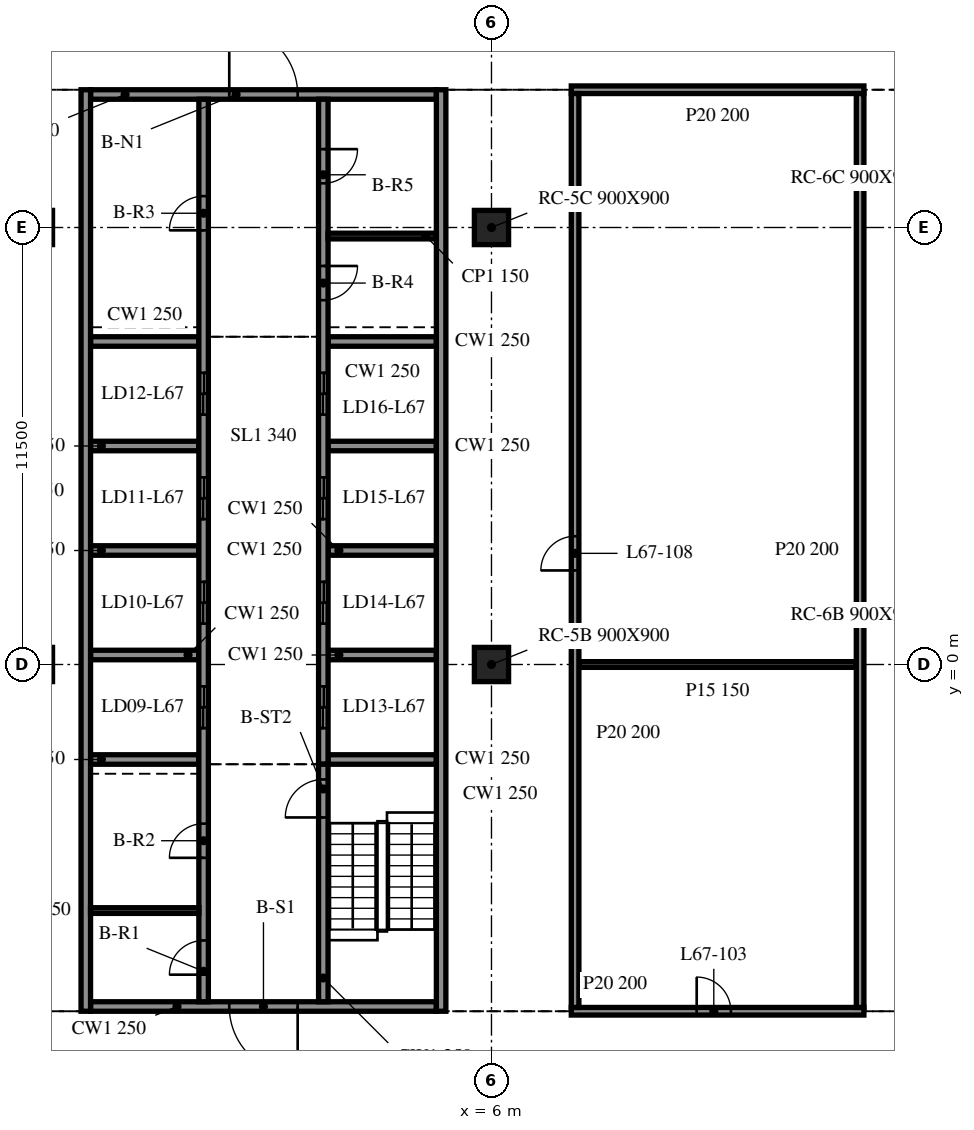
"""IFC4 building model, lengths in metres.
Left out: names, types, materials, properties, quantities, classifications, styles, units other than length and angle.
Written with IfcOpenShell. Run it as: python <this file> out.ifc"""

import sys

from ifc_helpers import new_model, si_unit, direction, frame, frame_2d, origin, origin_2d, place, context, subcontext, project, spatial, rectangle, extrude, element, fill, save


model = new_model("IFC4")
c1 = context("Model", 3, precision=1e-05, world=origin(), true_north=direction((0.0, 1.0)))
c2 = subcontext(c1, "Body", "Model", "MODEL_VIEW")
j1 = project(units=[si_unit("LENGTHUNIT", "METRE"), si_unit("PLANEANGLEUNIT", "RADIAN")], contexts=[c1])
p1 = place(None, origin())
s1 = spatial("IfcSite", under=j1, at=p1, CompositionType="ELEMENT")
p2 = place(p1, origin())
s2 = spatial("IfcBuilding", under=s1, at=p2, CompositionType="ELEMENT")
p3 = place(p2, frame((0.0, 0.0, 274.7)))
s3 = spatial("IfcBuildingStorey", under=s2, at=p3, CompositionType="ELEMENT", Elevation=274.7)
for number, where, z_axis, x_axis in (
    (1, (6.0, 0.0, -0.34), (0.0, 0.0, 1.0), (1.0, 0.0, 0.0)),
    (2, (6.0, 11.5, -0.34), (0.0, 0.0, 1.0), (1.0, 0.0, 0.0)),
):
    element("IfcColumn", number, at=place(p3, frame(where, z_axis=z_axis, x_axis=x_axis)), inside=s3, PredefinedType="COLUMN", context=c2, shape_type="SweptSolid", body=[
        extrude(rectangle(XDim=0.9, YDim=0.9, at=origin_2d()), origin(), (0.0, 0.0, 1.0), 3.8),
    ])
for number, where, z_axis, x_axis in (
    (3, (-4.675, 15.125, 0.0), (0.0, 0.0, 1.0), (0.0, -1.0, 0.0)),
    (4, (4.675, -9.125, 0.0), (0.0, 0.0, 1.0), (0.0, 1.0, 0.0)),
):
    element("IfcWall", number, at=place(p3, frame(where, z_axis=z_axis, x_axis=x_axis)), inside=s3, PredefinedType="SOLIDWALL", context=c2, shape_type="SweptSolid", body=[
        extrude(rectangle(XDim=24.25, YDim=0.25, at=frame_2d((12.125, 0.0))), origin(), (0.0, 0.0, 1.0), 3.46),
    ])
p4 = place(p3, frame((4.55, -9.0, 0.0), z_axis=(0.0, 0.0, 1.0), x_axis=(-1.0, 0.0, 0.0)))
e5 = element("IfcWall", 5, at=p4, inside=s3, PredefinedType="SOLIDWALL", context=c2, shape_type="SweptSolid", body=[
    extrude(rectangle(XDim=9.1, YDim=0.25, at=frame_2d((4.55, 0.0))), origin(), (0.0, 0.0, 1.0), 3.46),
])
p5 = place(p4, frame((3.65, 0.0, 0.0)))
e6 = element("IfcOpeningElement", 6, at=p5, cuts=e5, PredefinedType="OPENING", context=c2, shape_type="SweptSolid", body=[
    extrude(rectangle(XDim=1.8, YDim=2.1, at=frame_2d((0.9, 1.05))), frame((0.0, 0.135, 0.0), z_axis=(0.0, -1.0, 0.0), x_axis=(1.0, 0.0, 0.0)), (0.0, 0.0, 1.0), 0.27),
])
p6 = place(p3, frame((-4.55, 15.0, 0.0), z_axis=(0.0, 0.0, 1.0), x_axis=(1.0, 0.0, 0.0)))
e7 = element("IfcWall", 7, at=p6, inside=s3, PredefinedType="SOLIDWALL", context=c2, shape_type="SweptSolid", body=[
    extrude(rectangle(XDim=9.1, YDim=0.25, at=frame_2d((4.55, 0.0))), origin(), (0.0, 0.0, 1.0), 3.46),
])
p7 = place(p6, frame((3.65, 0.0, 0.0)))
e8 = element("IfcOpeningElement", 8, at=p7, cuts=e7, PredefinedType="OPENING", context=c2, shape_type="SweptSolid", body=[
    extrude(rectangle(XDim=1.8, YDim=2.1, at=frame_2d((0.9, 1.05))), frame((0.0, 0.135, 0.0), z_axis=(0.0, -1.0, 0.0), x_axis=(1.0, 0.0, 0.0)), (0.0, 0.0, 1.0), 0.27),
])
p8 = place(p3, frame((-1.575, -8.875, 0.0), z_axis=(0.0, 0.0, 1.0), x_axis=(0.0, 1.0, 0.0)))
e9 = element("IfcWall", 9, at=p8, inside=s3, PredefinedType="SOLIDWALL", context=c2, shape_type="SweptSolid", body=[
    extrude(rectangle(XDim=23.75, YDim=0.25, at=frame_2d((11.875, 0.0))), origin(), (0.0, 0.0, 1.0), 3.46),
])
p9 = place(p8, frame((7.2, 0.0, 0.0)))
e10 = element("IfcOpeningElement", 10, at=p9, cuts=e9, PredefinedType="OPENING", context=c2, shape_type="SweptSolid", body=[
    extrude(rectangle(XDim=1.1, YDim=2.1, at=frame_2d((0.55, 1.05))), frame((0.0, 0.135, 0.0), z_axis=(0.0, -1.0, 0.0), x_axis=(1.0, 0.0, 0.0)), (0.0, 0.0, 1.0), 0.27),
])
p10 = place(p8, frame((9.95, 0.0, 0.0)))
e11 = element("IfcOpeningElement", 11, at=p10, cuts=e9, PredefinedType="OPENING", context=c2, shape_type="SweptSolid", body=[
    extrude(rectangle(XDim=1.1, YDim=2.1, at=frame_2d((0.55, 1.05))), frame((0.0, 0.135, 0.0), z_axis=(0.0, -1.0, 0.0), x_axis=(1.0, 0.0, 0.0)), (0.0, 0.0, 1.0), 0.27),
])
p11 = place(p8, frame((12.7, 0.0, 0.0)))
e12 = element("IfcOpeningElement", 12, at=p11, cuts=e9, PredefinedType="OPENING", context=c2, shape_type="SweptSolid", body=[
    extrude(rectangle(XDim=1.1, YDim=2.1, at=frame_2d((0.55, 1.05))), frame((0.0, 0.135, 0.0), z_axis=(0.0, -1.0, 0.0), x_axis=(1.0, 0.0, 0.0)), (0.0, 0.0, 1.0), 0.27),
])
p12 = place(p8, frame((15.45, 0.0, 0.0)))
e13 = element("IfcOpeningElement", 13, at=p12, cuts=e9, PredefinedType="OPENING", context=c2, shape_type="SweptSolid", body=[
    extrude(rectangle(XDim=1.1, YDim=2.1, at=frame_2d((0.55, 1.05))), frame((0.0, 0.135, 0.0), z_axis=(0.0, -1.0, 0.0), x_axis=(1.0, 0.0, 0.0)), (0.0, 0.0, 1.0), 0.27),
])
p13 = place(p8, frame((0.712, 0.0, 0.0)))
e14 = element("IfcOpeningElement", 14, at=p13, cuts=e9, PredefinedType="OPENING", context=c2, shape_type="SweptSolid", body=[
    extrude(rectangle(XDim=0.9, YDim=2.1, at=frame_2d((0.45, 1.05))), frame((0.0, 0.135, 0.0), z_axis=(0.0, -1.0, 0.0), x_axis=(1.0, 0.0, 0.0)), (0.0, 0.0, 1.0), 0.27),
])
p14 = place(p8, frame((3.788, 0.0, 0.0)))
e15 = element("IfcOpeningElement", 15, at=p14, cuts=e9, PredefinedType="OPENING", context=c2, shape_type="SweptSolid", body=[
    extrude(rectangle(XDim=0.9, YDim=2.1, at=frame_2d((0.45, 1.05))), frame((0.0, 0.135, 0.0), z_axis=(0.0, -1.0, 0.0), x_axis=(1.0, 0.0, 0.0)), (0.0, 0.0, 1.0), 0.27),
])
p15 = place(p8, frame((20.3, 0.0, 0.0)))
e16 = element("IfcOpeningElement", 16, at=p15, cuts=e9, PredefinedType="OPENING", context=c2, shape_type="SweptSolid", body=[
    extrude(rectangle(XDim=0.9, YDim=2.1, at=frame_2d((0.45, 1.05))), frame((0.0, 0.135, 0.0), z_axis=(0.0, -1.0, 0.0), x_axis=(1.0, 0.0, 0.0)), (0.0, 0.0, 1.0), 0.27),
])
p16 = place(p3, frame((1.575, -8.875, 0.0), z_axis=(0.0, 0.0, 1.0), x_axis=(0.0, 1.0, 0.0)))
e17 = element("IfcWall", 17, at=p16, inside=s3, PredefinedType="SOLIDWALL", context=c2, shape_type="SweptSolid", body=[
    extrude(rectangle(XDim=6.25, YDim=0.25, at=frame_2d((3.125, 0.0))), origin(), (0.0, 0.0, 1.0), 3.46),
])
p17 = place(p16, frame((4.85, 0.0, 0.0)))
e18 = element("IfcOpeningElement", 18, at=p17, cuts=e17, PredefinedType="OPENING", context=c2, shape_type="SweptSolid", body=[
    extrude(rectangle(XDim=1.0, YDim=2.1, at=frame_2d((0.5, 1.05))), frame((0.0, 0.135, 0.0), z_axis=(0.0, -1.0, 0.0), x_axis=(1.0, 0.0, 0.0)), (0.0, 0.0, 1.0), 0.27),
])
p18 = place(p3, frame((1.575, 14.875, 0.0), z_axis=(0.0, 0.0, 1.0), x_axis=(0.0, -1.0, 0.0)))
e19 = element("IfcWall", 19, at=p18, inside=s3, PredefinedType="SOLIDWALL", context=c2, shape_type="SweptSolid", body=[
    extrude(rectangle(XDim=17.5, YDim=0.25, at=frame_2d((8.75, 0.0))), origin(), (0.0, 0.0, 1.0), 3.46),
])
p19 = place(p18, frame((15.45, 0.0, 0.0)))
e20 = element("IfcOpeningElement", 20, at=p19, cuts=e19, PredefinedType="OPENING", context=c2, shape_type="SweptSolid", body=[
    extrude(rectangle(XDim=1.1, YDim=2.1, at=frame_2d((0.55, 1.05))), frame((0.0, 0.135, 0.0), z_axis=(0.0, -1.0, 0.0), x_axis=(1.0, 0.0, 0.0)), (0.0, 0.0, 1.0), 0.27),
])
p20 = place(p18, frame((12.7, 0.0, 0.0)))
e21 = element("IfcOpeningElement", 21, at=p20, cuts=e19, PredefinedType="OPENING", context=c2, shape_type="SweptSolid", body=[
    extrude(rectangle(XDim=1.1, YDim=2.1, at=frame_2d((0.55, 1.05))), frame((0.0, 0.135, 0.0), z_axis=(0.0, -1.0, 0.0), x_axis=(1.0, 0.0, 0.0)), (0.0, 0.0, 1.0), 0.27),
])
p21 = place(p18, frame((9.95, 0.0, 0.0)))
e22 = element("IfcOpeningElement", 22, at=p21, cuts=e19, PredefinedType="OPENING", context=c2, shape_type="SweptSolid", body=[
    extrude(rectangle(XDim=1.1, YDim=2.1, at=frame_2d((0.55, 1.05))), frame((0.0, 0.135, 0.0), z_axis=(0.0, -1.0, 0.0), x_axis=(1.0, 0.0, 0.0)), (0.0, 0.0, 1.0), 0.27),
])
p22 = place(p18, frame((7.2, 0.0, 0.0)))
e23 = element("IfcOpeningElement", 23, at=p22, cuts=e19, PredefinedType="OPENING", context=c2, shape_type="SweptSolid", body=[
    extrude(rectangle(XDim=1.1, YDim=2.1, at=frame_2d((0.55, 1.05))), frame((0.0, 0.135, 0.0), z_axis=(0.0, -1.0, 0.0), x_axis=(1.0, 0.0, 0.0)), (0.0, 0.0, 1.0), 0.27),
])
p23 = place(p18, frame((4.387, 0.0, 0.0)))
e24 = element("IfcOpeningElement", 24, at=p23, cuts=e19, PredefinedType="OPENING", context=c2, shape_type="SweptSolid", body=[
    extrude(rectangle(XDim=0.9, YDim=2.1, at=frame_2d((0.45, 1.05))), frame((0.0, 0.135, 0.0), z_axis=(0.0, -1.0, 0.0), x_axis=(1.0, 0.0, 0.0)), (0.0, 0.0, 1.0), 0.27),
])
p24 = place(p18, frame((1.312, 0.0, 0.0)))
e25 = element("IfcOpeningElement", 25, at=p24, cuts=e19, PredefinedType="OPENING", context=c2, shape_type="SweptSolid", body=[
    extrude(rectangle(XDim=0.9, YDim=2.1, at=frame_2d((0.45, 1.05))), frame((0.0, 0.135, 0.0), z_axis=(0.0, -1.0, 0.0), x_axis=(1.0, 0.0, 0.0)), (0.0, 0.0, 1.0), 0.27),
])
for number, where, z_axis, x_axis in (
    (26, (-4.55, -2.5, 0.0), (0.0, 0.0, 1.0), (1.0, 0.0, 0.0)),
    (27, (-4.55, 0.25, 0.0), (0.0, 0.0, 1.0), (1.0, 0.0, 0.0)),
    (28, (-4.55, 3.0, 0.0), (0.0, 0.0, 1.0), (1.0, 0.0, 0.0)),
    (29, (-4.55, 5.75, 0.0), (0.0, 0.0, 1.0), (1.0, 0.0, 0.0)),
    (30, (-4.55, 8.5, 0.0), (0.0, 0.0, 1.0), (1.0, 0.0, 0.0)),
    (31, (1.7, -2.5, 0.0), (0.0, 0.0, 1.0), (1.0, 0.0, 0.0)),
    (32, (1.7, 0.25, 0.0), (0.0, 0.0, 1.0), (1.0, 0.0, 0.0)),
    (33, (1.7, 3.0, 0.0), (0.0, 0.0, 1.0), (1.0, 0.0, 0.0)),
    (34, (1.7, 5.75, 0.0), (0.0, 0.0, 1.0), (1.0, 0.0, 0.0)),
    (35, (1.7, 8.5, 0.0), (0.0, 0.0, 1.0), (1.0, 0.0, 0.0)),
):
    element("IfcWall", number, at=place(p3, frame(where, z_axis=z_axis, x_axis=x_axis)), inside=s3, PredefinedType="SOLIDWALL", context=c2, shape_type="SweptSolid", body=[
        extrude(rectangle(XDim=2.85, YDim=0.25, at=frame_2d((1.425, 0.0))), origin(), (0.0, 0.0, 1.0), 3.46),
    ])
for number, where, z_axis, x_axis in (
    (36, (-4.55, -6.475, 0.0), (0.0, 0.0, 1.0), (1.0, 0.0, 0.0)),
    (37, (1.7, 11.275, 0.0), (0.0, 0.0, 1.0), (1.0, 0.0, 0.0)),
):
    element("IfcWall", number, at=place(p3, frame(where, z_axis=z_axis, x_axis=x_axis)), inside=s3, PredefinedType="PARTITIONING", context=c2, shape_type="SweptSolid", body=[
        extrude(rectangle(XDim=2.85, YDim=0.15, at=frame_2d((1.425, 0.0))), origin(), (0.0, 0.0, 1.0), 3.46),
    ])
p25 = place(p3, frame((8.1, -9.125, 0.0), z_axis=(0.0, 0.0, 1.0), x_axis=(1.0, 0.0, 0.0)))
e38 = element("IfcWall", 38, at=p25, inside=s3, PredefinedType="PARTITIONING", context=c2, shape_type="SweptSolid", body=[
    extrude(rectangle(XDim=7.7, YDim=0.2, at=frame_2d((3.85, 0.0))), origin(), (0.0, 0.0, 1.0), 3.46),
])
p26 = place(p25, frame((3.3, 0.0, 0.0)))
e39 = element("IfcOpeningElement", 39, at=p26, cuts=e38, PredefinedType="OPENING", context=c2, shape_type="SweptSolid", body=[
    extrude(rectangle(XDim=0.9, YDim=2.1, at=frame_2d((0.45, 1.05))), frame((0.0, 0.11, 0.0), z_axis=(0.0, -1.0, 0.0), x_axis=(1.0, 0.0, 0.0)), (0.0, 0.0, 1.0), 0.22),
])
p27 = place(p3, frame((8.3, 0.0, 0.0), z_axis=(0.0, 0.0, 1.0), x_axis=(1.0, 0.0, 0.0)))
e40 = element("IfcWall", 40, at=p27, inside=s3, PredefinedType="PARTITIONING", context=c2, shape_type="SweptSolid", body=[
    extrude(rectangle(XDim=7.3, YDim=0.15, at=frame_2d((3.65, 0.0))), origin(), (0.0, 0.0, 1.0), 3.46),
])
p28 = place(p3, frame((8.1, 15.125, 0.0), z_axis=(0.0, 0.0, 1.0), x_axis=(1.0, 0.0, 0.0)))
e41 = element("IfcWall", 41, at=p28, inside=s3, PredefinedType="PARTITIONING", context=c2, shape_type="SweptSolid", body=[
    extrude(rectangle(XDim=7.7, YDim=0.2, at=frame_2d((3.85, 0.0))), origin(), (0.0, 0.0, 1.0), 3.46),
])
p29 = place(p3, frame((8.2, -9.025, 0.0), z_axis=(0.0, 0.0, 1.0), x_axis=(0.0, 1.0, 0.0)))
e42 = element("IfcWall", 42, at=p29, inside=s3, PredefinedType="PARTITIONING", context=c2, shape_type="SweptSolid", body=[
    extrude(rectangle(XDim=24.05, YDim=0.2, at=frame_2d((12.025, 0.0))), origin(), (0.0, 0.0, 1.0), 3.46),
])
p30 = place(p29, frame((11.5, 0.0, 0.0)))
e43 = element("IfcOpeningElement", 43, at=p30, cuts=e42, PredefinedType="OPENING", context=c2, shape_type="SweptSolid", body=[
    extrude(rectangle(XDim=0.9, YDim=2.1, at=frame_2d((0.45, 1.05))), frame((0.0, 0.11, 0.0), z_axis=(0.0, -1.0, 0.0), x_axis=(1.0, 0.0, 0.0)), (0.0, 0.0, 1.0), 0.22),
])
p31 = place(p3, frame((15.7, -9.025, 0.0), z_axis=(0.0, 0.0, 1.0), x_axis=(0.0, 1.0, 0.0)))
e44 = element("IfcWall", 44, at=p31, inside=s3, PredefinedType="PARTITIONING", context=c2, shape_type="SweptSolid", body=[
    extrude(rectangle(XDim=24.05, YDim=0.2, at=frame_2d((12.025, 0.0))), origin(), (0.0, 0.0, 1.0), 3.46),
])
p32 = place(p5, origin())
e45 = element("IfcDoor", 45, at=p32, inside=s3, OperationType="DOUBLE_DOOR_SINGLE_SWING", PredefinedType="DOOR", context=c2, shape_type="SweptSolid", body=[
    extrude(rectangle(XDim=1.8, YDim=2.1, at=frame_2d((0.9, 1.05))), frame((0.0, 0.025, 0.0), z_axis=(0.0, -1.0, 0.0), x_axis=(1.0, 0.0, 0.0)), (0.0, 0.0, 1.0), 0.05),
])
fill(e6, e45)
p33 = place(p7, origin())
e46 = element("IfcDoor", 46, at=p33, inside=s3, OperationType="DOUBLE_DOOR_SINGLE_SWING", PredefinedType="DOOR", context=c2, shape_type="SweptSolid", body=[
    extrude(rectangle(XDim=1.8, YDim=2.1, at=frame_2d((0.9, 1.05))), frame((0.0, 0.025, 0.0), z_axis=(0.0, -1.0, 0.0), x_axis=(1.0, 0.0, 0.0)), (0.0, 0.0, 1.0), 0.05),
])
fill(e8, e46)
p34 = place(p19, origin())
e47 = element("IfcDoor", 47, at=p34, inside=s3, OperationType="DOUBLE_DOOR_SLIDING", PredefinedType="DOOR", context=c2, shape_type="SweptSolid", body=[
    extrude(rectangle(XDim=1.1, YDim=2.1, at=frame_2d((0.55, 1.05))), frame((0.0, 0.025, 0.0), z_axis=(0.0, -1.0, 0.0), x_axis=(1.0, 0.0, 0.0)), (0.0, 0.0, 1.0), 0.05),
])
fill(e20, e47)
p35 = place(p20, origin())
e48 = element("IfcDoor", 48, at=p35, inside=s3, OperationType="DOUBLE_DOOR_SLIDING", PredefinedType="DOOR", context=c2, shape_type="SweptSolid", body=[
    extrude(rectangle(XDim=1.1, YDim=2.1, at=frame_2d((0.55, 1.05))), frame((0.0, 0.025, 0.0), z_axis=(0.0, -1.0, 0.0), x_axis=(1.0, 0.0, 0.0)), (0.0, 0.0, 1.0), 0.05),
])
fill(e21, e48)
p36 = place(p21, origin())
e49 = element("IfcDoor", 49, at=p36, inside=s3, OperationType="DOUBLE_DOOR_SLIDING", PredefinedType="DOOR", context=c2, shape_type="SweptSolid", body=[
    extrude(rectangle(XDim=1.1, YDim=2.1, at=frame_2d((0.55, 1.05))), frame((0.0, 0.025, 0.0), z_axis=(0.0, -1.0, 0.0), x_axis=(1.0, 0.0, 0.0)), (0.0, 0.0, 1.0), 0.05),
])
fill(e22, e49)
p37 = place(p22, origin())
e50 = element("IfcDoor", 50, at=p37, inside=s3, OperationType="DOUBLE_DOOR_SLIDING", PredefinedType="DOOR", context=c2, shape_type="SweptSolid", body=[
    extrude(rectangle(XDim=1.1, YDim=2.1, at=frame_2d((0.55, 1.05))), frame((0.0, 0.025, 0.0), z_axis=(0.0, -1.0, 0.0), x_axis=(1.0, 0.0, 0.0)), (0.0, 0.0, 1.0), 0.05),
])
fill(e23, e50)
p38 = place(p9, origin())
e51 = element("IfcDoor", 51, at=p38, inside=s3, OperationType="DOUBLE_DOOR_SLIDING", PredefinedType="DOOR", context=c2, shape_type="SweptSolid", body=[
    extrude(rectangle(XDim=1.1, YDim=2.1, at=frame_2d((0.55, 1.05))), frame((0.0, 0.025, 0.0), z_axis=(0.0, -1.0, 0.0), x_axis=(1.0, 0.0, 0.0)), (0.0, 0.0, 1.0), 0.05),
])
fill(e10, e51)
p39 = place(p10, origin())
e52 = element("IfcDoor", 52, at=p39, inside=s3, OperationType="DOUBLE_DOOR_SLIDING", PredefinedType="DOOR", context=c2, shape_type="SweptSolid", body=[
    extrude(rectangle(XDim=1.1, YDim=2.1, at=frame_2d((0.55, 1.05))), frame((0.0, 0.025, 0.0), z_axis=(0.0, -1.0, 0.0), x_axis=(1.0, 0.0, 0.0)), (0.0, 0.0, 1.0), 0.05),
])
fill(e11, e52)
p40 = place(p11, origin())
e53 = element("IfcDoor", 53, at=p40, inside=s3, OperationType="DOUBLE_DOOR_SLIDING", PredefinedType="DOOR", context=c2, shape_type="SweptSolid", body=[
    extrude(rectangle(XDim=1.1, YDim=2.1, at=frame_2d((0.55, 1.05))), frame((0.0, 0.025, 0.0), z_axis=(0.0, -1.0, 0.0), x_axis=(1.0, 0.0, 0.0)), (0.0, 0.0, 1.0), 0.05),
])
fill(e12, e53)
p41 = place(p12, origin())
e54 = element("IfcDoor", 54, at=p41, inside=s3, OperationType="DOUBLE_DOOR_SLIDING", PredefinedType="DOOR", context=c2, shape_type="SweptSolid", body=[
    extrude(rectangle(XDim=1.1, YDim=2.1, at=frame_2d((0.55, 1.05))), frame((0.0, 0.025, 0.0), z_axis=(0.0, -1.0, 0.0), x_axis=(1.0, 0.0, 0.0)), (0.0, 0.0, 1.0), 0.05),
])
fill(e13, e54)
p42 = place(p13, origin())
e55 = element("IfcDoor", 55, at=p42, inside=s3, OperationType="SINGLE_SWING_LEFT", PredefinedType="DOOR", context=c2, shape_type="SweptSolid", body=[
    extrude(rectangle(XDim=0.9, YDim=2.1, at=frame_2d((0.45, 1.05))), frame((0.0, 0.025, 0.0), z_axis=(0.0, -1.0, 0.0), x_axis=(1.0, 0.0, 0.0)), (0.0, 0.0, 1.0), 0.05),
])
fill(e14, e55)
p43 = place(p14, origin())
e56 = element("IfcDoor", 56, at=p43, inside=s3, OperationType="SINGLE_SWING_RIGHT", PredefinedType="DOOR", context=c2, shape_type="SweptSolid", body=[
    extrude(rectangle(XDim=0.9, YDim=2.1, at=frame_2d((0.45, 1.05))), frame((0.0, 0.025, 0.0), z_axis=(0.0, -1.0, 0.0), x_axis=(1.0, 0.0, 0.0)), (0.0, 0.0, 1.0), 0.05),
])
fill(e15, e56)
p44 = place(p15, origin())
e57 = element("IfcDoor", 57, at=p44, inside=s3, OperationType="SINGLE_SWING_LEFT", PredefinedType="DOOR", context=c2, shape_type="SweptSolid", body=[
    extrude(rectangle(XDim=0.9, YDim=2.1, at=frame_2d((0.45, 1.05))), frame((0.0, 0.025, 0.0), z_axis=(0.0, -1.0, 0.0), x_axis=(1.0, 0.0, 0.0)), (0.0, 0.0, 1.0), 0.05),
])
fill(e16, e57)
p45 = place(p23, origin())
e58 = element("IfcDoor", 58, at=p45, inside=s3, OperationType="SINGLE_SWING_RIGHT", PredefinedType="DOOR", context=c2, shape_type="SweptSolid", body=[
    extrude(rectangle(XDim=0.9, YDim=2.1, at=frame_2d((0.45, 1.05))), frame((0.0, 0.025, 0.0), z_axis=(0.0, -1.0, 0.0), x_axis=(1.0, 0.0, 0.0)), (0.0, 0.0, 1.0), 0.05),
])
fill(e24, e58)
p46 = place(p24, origin())
e59 = element("IfcDoor", 59, at=p46, inside=s3, OperationType="SINGLE_SWING_LEFT", PredefinedType="DOOR", context=c2, shape_type="SweptSolid", body=[
    extrude(rectangle(XDim=0.9, YDim=2.1, at=frame_2d((0.45, 1.05))), frame((0.0, 0.025, 0.0), z_axis=(0.0, -1.0, 0.0), x_axis=(1.0, 0.0, 0.0)), (0.0, 0.0, 1.0), 0.05),
])
fill(e25, e59)
p47 = place(p17, origin())
e60 = element("IfcDoor", 60, at=p47, inside=s3, OperationType="SINGLE_SWING_RIGHT", PredefinedType="DOOR", context=c2, shape_type="SweptSolid", body=[
    extrude(rectangle(XDim=1.0, YDim=2.1, at=frame_2d((0.5, 1.05))), frame((0.0, 0.025, 0.0), z_axis=(0.0, -1.0, 0.0), x_axis=(1.0, 0.0, 0.0)), (0.0, 0.0, 1.0), 0.05),
])
fill(e18, e60)
p48 = place(p26, origin())
e61 = element("IfcDoor", 61, at=p48, inside=s3, OperationType="SINGLE_SWING_LEFT", PredefinedType="DOOR", context=c2, shape_type="SweptSolid", body=[
    extrude(rectangle(XDim=0.9, YDim=2.1, at=frame_2d((0.45, 1.05))), frame((0.0, 0.025, 0.0), z_axis=(0.0, -1.0, 0.0), x_axis=(1.0, 0.0, 0.0)), (0.0, 0.0, 1.0), 0.05),
])
fill(e39, e61)
p49 = place(p30, origin())
e62 = element("IfcDoor", 62, at=p49, inside=s3, OperationType="SINGLE_SWING_RIGHT", PredefinedType="DOOR", context=c2, shape_type="SweptSolid", body=[
    extrude(rectangle(XDim=0.9, YDim=2.1, at=frame_2d((0.45, 1.05))), frame((0.0, 0.025, 0.0), z_axis=(0.0, -1.0, 0.0), x_axis=(1.0, 0.0, 0.0)), (0.0, 0.0, 1.0), 0.05),
])
fill(e43, e62)
save(model, sys.argv[1])
